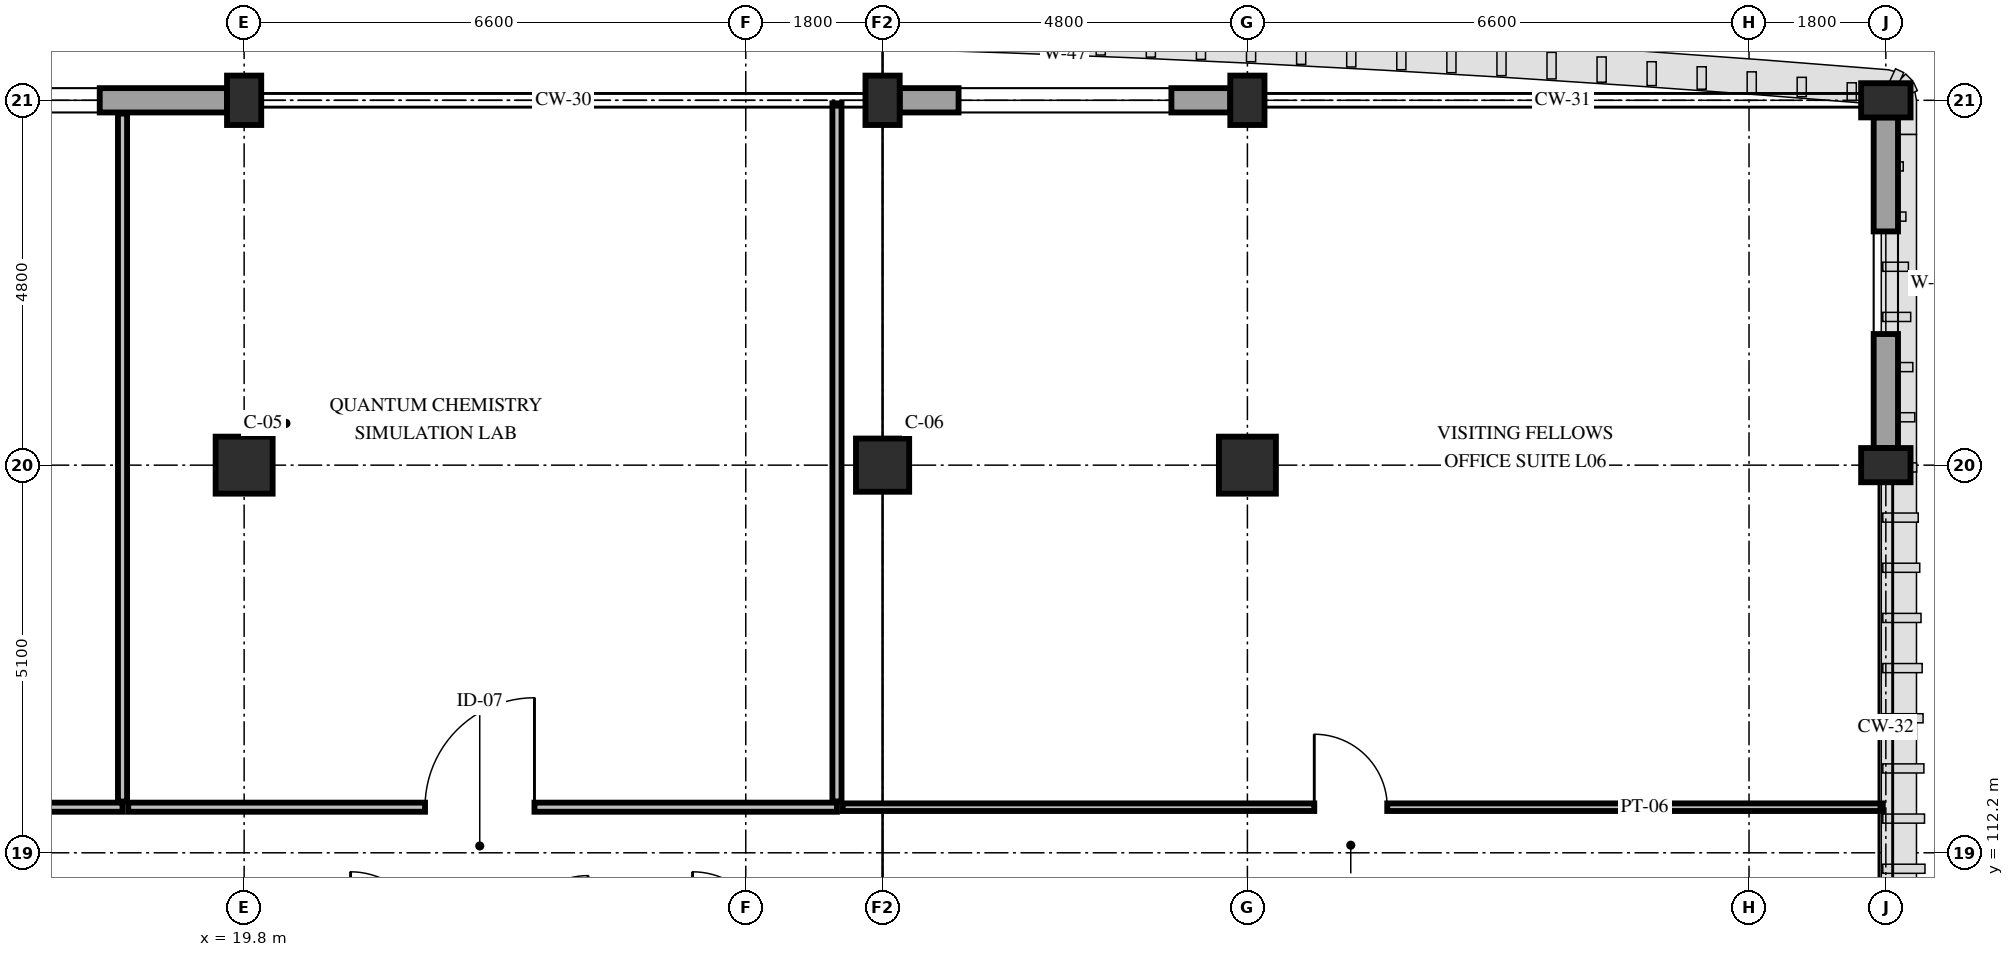
"""IFC4 building model, lengths in metres.
Left out: names, types, materials, properties, quantities, classifications, styles, units other than length and angle.
Written with IfcOpenShell. Run it as: python <this file> out.ifc"""

import sys

from ifc_helpers import new_model, si_unit, direction, frame, frame_2d, origin, origin_2d, place, context, subcontext, project, spatial, rectangle, extrude, element, fill, save


model = new_model("IFC4")
c1 = context("Model", 3, precision=1e-05, world=origin(), true_north=direction((0.0, 1.0)))
c2 = subcontext(c1, "Body", "Model", "MODEL_VIEW")
j1 = project(units=[si_unit("LENGTHUNIT", "METRE"), si_unit("PLANEANGLEUNIT", "RADIAN")], contexts=[c1])
p1 = place(None, origin())
s1 = spatial("IfcSite", under=j1, at=p1, CompositionType="ELEMENT")
p2 = place(p1, origin())
s2 = spatial("IfcBuilding", under=s1, at=p2, CompositionType="ELEMENT")
p3 = place(p2, frame((0.0, 0.0, 29.4)))
s3 = spatial("IfcBuildingStorey", under=s2, at=p3, CompositionType="ELEMENT", Elevation=29.4)
p4 = place(p3, frame((19.8, 117.3, 0.0), z_axis=(0.0, 0.0, 1.0), x_axis=(1.0, 0.0, 0.0)))
e1 = element("IfcColumn", 1, at=p4, inside=s3, PredefinedType="COLUMN", context=c2, shape_type="SweptSolid", body=[
    extrude(rectangle(XDim=0.75, YDim=0.75, at=origin_2d()), origin(), (0.0, 0.0, 1.0), 4.8),
])
p5 = place(p3, frame((19.8, 122.1, 0.0), z_axis=(0.0, 0.0, 1.0), x_axis=(1.0, 0.0, 0.0)))
e2 = element("IfcColumn", 2, at=p5, inside=s3, PredefinedType="PILASTER", context=c2, shape_type="SweptSolid", body=[
    extrude(rectangle(XDim=0.45, YDim=0.65, at=origin_2d()), origin(), (0.0, 0.0, 1.0), 4.8),
])
p6 = place(p3, frame((28.2, 117.3, 0.0), z_axis=(0.0, 0.0, 1.0), x_axis=(1.0, 0.0, 0.0)))
e3 = element("IfcColumn", 3, at=p6, inside=s3, PredefinedType="COLUMN", context=c2, shape_type="SweptSolid", body=[
    extrude(rectangle(XDim=0.7, YDim=0.7, at=origin_2d()), origin(), (0.0, 0.0, 1.0), 4.8),
])
p7 = place(p3, frame((28.2, 122.1, 0.0), z_axis=(0.0, 0.0, 1.0), x_axis=(1.0, 0.0, 0.0)))
e4 = element("IfcColumn", 4, at=p7, inside=s3, PredefinedType="PILASTER", context=c2, shape_type="SweptSolid", body=[
    extrude(rectangle(XDim=0.45, YDim=0.65, at=origin_2d()), origin(), (0.0, 0.0, 1.0), 4.8),
])
p8 = place(p3, frame((33.0, 117.3, 0.0), z_axis=(0.0, 0.0, 1.0), x_axis=(1.0, 0.0, 0.0)))
e5 = element("IfcColumn", 5, at=p8, inside=s3, PredefinedType="COLUMN", context=c2, shape_type="SweptSolid", body=[
    extrude(rectangle(XDim=0.75, YDim=0.75, at=origin_2d()), origin(), (0.0, 0.0, 1.0), 4.8),
])
for number, where, z_axis, x_axis in (
    (6, (33.0, 122.1, 0.0), (0.0, 0.0, 1.0), (1.0, 0.0, 0.0)),
    (7, (41.4, 117.3, 0.0), (0.0, 0.0, 1.0), (0.0, 1.0, 0.0)),
    (8, (41.4, 122.1, 0.0), (0.0, 0.0, 1.0), (0.0, 1.0, 0.0)),
):
    element("IfcColumn", number, at=place(p3, frame(where, z_axis=z_axis, x_axis=x_axis)), inside=s3, PredefinedType="PILASTER", context=c2, shape_type="SweptSolid", body=[
        extrude(rectangle(XDim=0.45, YDim=0.65, at=origin_2d()), origin(), (0.0, 0.0, 1.0), 4.8),
    ])
p9 = place(p3, frame((13.425, 122.1, 0.0), z_axis=(0.0, 0.0, 1.0), x_axis=(1.0, 0.0, 0.0)))
e9 = element("IfcWall", 9, at=p9, inside=s3, PredefinedType="STANDARD", context=c2, shape_type="SweptSolid", body=[
    extrude(rectangle(XDim=6.15, YDim=0.32, at=frame_2d((3.075, 0.0))), origin(), (0.0, 0.0, 1.0), 3.93),
])
p10 = place(p9, frame((1.675, 0.0, 0.85)))
e10 = element("IfcOpeningElement", 10, at=p10, cuts=e9, PredefinedType="OPENING", context=c2, shape_type="SweptSolid", body=[
    extrude(rectangle(XDim=2.8, YDim=2.08, at=frame_2d((1.4, 1.04))), frame((0.0, 0.175, 0.0), z_axis=(0.0, -1.0, 0.0), x_axis=(1.0, 0.0, 0.0)), (0.0, 0.0, 1.0), 0.35),
])
p11 = place(p3, frame((28.425, 122.1, 0.0), z_axis=(0.0, 0.0, 1.0), x_axis=(1.0, 0.0, 0.0)))
e11 = element("IfcWall", 11, at=p11, inside=s3, PredefinedType="STANDARD", context=c2, shape_type="SweptSolid", body=[
    extrude(rectangle(XDim=4.35, YDim=0.32, at=frame_2d((2.175, 0.0))), origin(), (0.0, 0.0, 1.0), 3.95),
])
p12 = place(p11, frame((0.775, 0.0, 0.85)))
e12 = element("IfcOpeningElement", 12, at=p12, cuts=e11, PredefinedType="OPENING", context=c2, shape_type="SweptSolid", body=[
    extrude(rectangle(XDim=2.8, YDim=2.08, at=frame_2d((1.4, 1.04))), frame((0.0, 0.175, 0.0), z_axis=(0.0, -1.0, 0.0), x_axis=(1.0, 0.0, 0.0)), (0.0, 0.0, 1.0), 0.35),
])
p13 = place(p3, frame((41.4, 121.875, 0.0), z_axis=(0.0, 0.0, 1.0), x_axis=(0.0, -1.0, 0.0)))
e13 = element("IfcWall", 13, at=p13, inside=s3, PredefinedType="STANDARD", context=c2, shape_type="SweptSolid", body=[
    extrude(rectangle(XDim=4.35, YDim=0.32, at=frame_2d((2.175, 0.0))), origin(), (0.0, 0.0, 1.0), 3.83),
])
p14 = place(p13, frame((1.5, 0.0, 0.85)))
e14 = element("IfcOpeningElement", 14, at=p14, cuts=e13, PredefinedType="OPENING", context=c2, shape_type="SweptSolid", body=[
    extrude(rectangle(XDim=1.35, YDim=1.66, at=frame_2d((0.675, 0.83))), frame((0.0, 0.175, 0.0), z_axis=(0.0, -1.0, 0.0), x_axis=(1.0, 0.0, 0.0)), (0.0, 0.0, 1.0), 0.35),
])
p15 = place(p3, frame((4.875, 112.8, 0.0), z_axis=(0.0, 0.0, 1.0), x_axis=(1.0, 0.0, 0.0)))
e15 = element("IfcWall", 15, at=p15, inside=s3, PredefinedType="PARTITIONING", context=c2, shape_type="SweptSolid", body=[
    extrude(rectangle(XDim=13.325, YDim=0.12, at=frame_2d((6.663, 0.0))), origin(), (0.0, 0.0, 1.0), 4.08),
])
p16 = place(p15, frame((5.995, 0.0, 0.0)))
e16 = element("IfcOpeningElement", 16, at=p16, cuts=e15, PredefinedType="OPENING", context=c2, shape_type="SweptSolid", body=[
    extrude(rectangle(XDim=1.26, YDim=2.2, at=frame_2d((0.63, 1.1))), frame((0.0, 0.075, 0.0), z_axis=(0.0, -1.0, 0.0), x_axis=(1.0, 0.0, 0.0)), (0.0, 0.0, 1.0), 0.15),
])
p17 = place(p3, frame((18.2, 112.875, 0.0), z_axis=(0.0, 0.0, 1.0), x_axis=(0.0, 1.0, 0.0)))
e17 = element("IfcWall", 17, at=p17, inside=s3, PredefinedType="PARTITIONING", context=c2, shape_type="SweptSolid", body=[
    extrude(rectangle(XDim=9.05, YDim=0.12, at=frame_2d((4.525, 0.0))), origin(), (0.0, 0.0, 1.0), 3.93),
])
p18 = place(p3, frame((18.275, 112.8, 0.0), z_axis=(0.0, 0.0, 1.0), x_axis=(1.0, 0.0, 0.0)))
e18 = element("IfcWall", 18, at=p18, inside=s3, PredefinedType="PARTITIONING", context=c2, shape_type="SweptSolid", body=[
    extrude(rectangle(XDim=9.325, YDim=0.12, at=frame_2d((4.663, 0.0))), origin(), (0.0, 0.0, 1.0), 4.13),
])
p19 = place(p18, frame((3.905, 0.0, 0.0)))
e19 = element("IfcOpeningElement", 19, at=p19, cuts=e18, PredefinedType="OPENING", context=c2, shape_type="SweptSolid", body=[
    extrude(rectangle(XDim=1.44, YDim=2.25, at=frame_2d((0.72, 1.125))), frame((0.0, 0.075, 0.0), z_axis=(0.0, -1.0, 0.0), x_axis=(1.0, 0.0, 0.0)), (0.0, 0.0, 1.0), 0.15),
])
p20 = place(p3, frame((27.6, 112.875, 0.0), z_axis=(0.0, 0.0, 1.0), x_axis=(0.0, 1.0, 0.0)))
e20 = element("IfcWall", 20, at=p20, inside=s3, PredefinedType="PARTITIONING", context=c2, shape_type="SweptSolid", body=[
    extrude(rectangle(XDim=9.185, YDim=0.12, at=frame_2d((4.593, 0.0))), origin(), (0.0, 0.0, 1.0), 3.83),
])
p21 = place(p3, frame((27.675, 112.8, 0.0), z_axis=(0.0, 0.0, 1.0), x_axis=(1.0, 0.0, 0.0)))
e21 = element("IfcWall", 21, at=p21, inside=s3, PredefinedType="PARTITIONING", context=c2, shape_type="SweptSolid", body=[
    extrude(rectangle(XDim=13.685, YDim=0.1, at=frame_2d((6.843, 0.0))), origin(), (0.0, 0.0, 1.0), 4.08),
])
p22 = place(p21, frame((6.205, 0.0, 0.0)))
e22 = element("IfcOpeningElement", 22, at=p22, cuts=e21, PredefinedType="OPENING", context=c2, shape_type="SweptSolid", body=[
    extrude(rectangle(XDim=0.96, YDim=2.15, at=frame_2d((0.48, 1.075))), frame((0.0, 0.065, 0.0), z_axis=(0.0, -1.0, 0.0), x_axis=(1.0, 0.0, 0.0)), (0.0, 0.0, 1.0), 0.13),
])
p23 = place(p10, origin())
e23 = element("IfcWindow", 23, at=p23, inside=s3, PartitioningType="DOUBLE_PANEL_VERTICAL", PredefinedType="WINDOW", context=c2, shape_type="SweptSolid", body=[
    extrude(rectangle(XDim=2.8, YDim=2.08, at=frame_2d((1.4, 1.04))), frame((0.0, 0.03, 0.0), z_axis=(0.0, -1.0, 0.0), x_axis=(1.0, 0.0, 0.0)), (0.0, 0.0, 1.0), 0.06),
])
fill(e10, e23)
p24 = place(p12, origin())
e24 = element("IfcWindow", 24, at=p24, inside=s3, PartitioningType="DOUBLE_PANEL_VERTICAL", PredefinedType="WINDOW", context=c2, shape_type="SweptSolid", body=[
    extrude(rectangle(XDim=2.8, YDim=2.08, at=frame_2d((1.4, 1.04))), frame((0.0, 0.03, 0.0), z_axis=(0.0, -1.0, 0.0), x_axis=(1.0, 0.0, 0.0)), (0.0, 0.0, 1.0), 0.06),
])
fill(e12, e24)
p25 = place(p14, origin())
e25 = element("IfcWindow", 25, at=p25, inside=s3, PartitioningType="SINGLE_PANEL", PredefinedType="WINDOW", context=c2, shape_type="SweptSolid", body=[
    extrude(rectangle(XDim=1.35, YDim=1.66, at=frame_2d((0.675, 0.83))), frame((0.0, 0.03, 0.0), z_axis=(0.0, -1.0, 0.0), x_axis=(1.0, 0.0, 0.0)), (0.0, 0.0, 1.0), 0.06),
])
fill(e14, e25)
p26 = place(p19, origin())
e26 = element("IfcDoor", 26, at=p26, inside=s3, OperationType="SINGLE_SWING_RIGHT", PredefinedType="DOOR", context=c2, shape_type="SweptSolid", body=[
    extrude(rectangle(XDim=1.44, YDim=2.25, at=frame_2d((0.72, 1.125))), frame((0.0, 0.025, 0.0), z_axis=(0.0, -1.0, 0.0), x_axis=(1.0, 0.0, 0.0)), (0.0, 0.0, 1.0), 0.05),
])
fill(e19, e26)
p27 = place(p22, origin())
e27 = element("IfcDoor", 27, at=p27, inside=s3, OperationType="SINGLE_SWING_LEFT", PredefinedType="DOOR", context=c2, shape_type="SweptSolid", body=[
    extrude(rectangle(XDim=0.96, YDim=2.15, at=frame_2d((0.48, 1.075))), frame((0.0, 0.025, 0.0), z_axis=(0.0, -1.0, 0.0), x_axis=(1.0, 0.0, 0.0)), (0.0, 0.0, 1.0), 0.05),
])
fill(e22, e27)
save(model, sys.argv[1])
